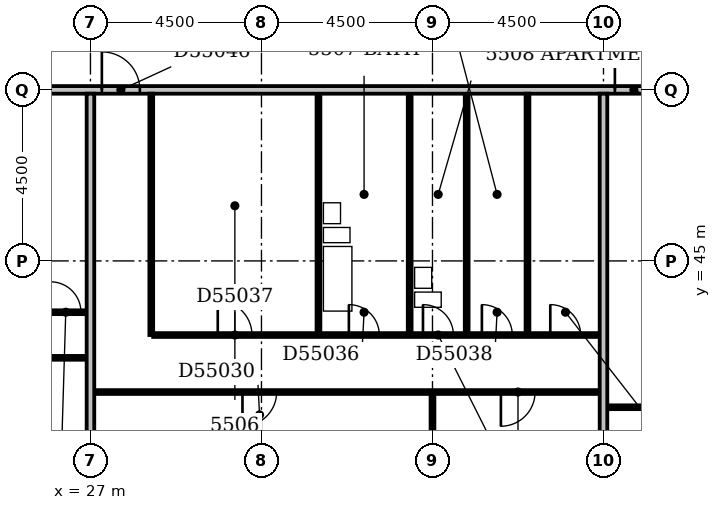
"""IFC4 building model, lengths in metres.
Left out: names, types, materials, properties, quantities, classifications, styles, units other than length and angle.
Written with IfcOpenShell. Run it as: python <this file> out.ifc"""

import sys

from ifc_helpers import new_model, si_unit, direction, frame, frame_2d, origin, place, context, subcontext, project, spatial, rectangle, extrude, element, fill, save


model = new_model("IFC4")
c1 = context("Model", 3, precision=1e-05, world=origin(), true_north=direction((0.0, 1.0)))
c2 = subcontext(c1, "Body", "Model", "MODEL_VIEW")
j1 = project(units=[si_unit("LENGTHUNIT", "METRE"), si_unit("PLANEANGLEUNIT", "RADIAN")], contexts=[c1])
p1 = place(None, origin())
s1 = spatial("IfcSite", under=j1, at=p1, CompositionType="ELEMENT")
p2 = place(p1, origin())
s2 = spatial("IfcBuilding", under=s1, at=p2, CompositionType="ELEMENT")
p3 = place(p2, frame((0.0, 0.0, 215.0)))
s3 = spatial("IfcBuildingStorey", under=s2, at=p3, CompositionType="ELEMENT", Elevation=215.0)
p4 = place(p3, frame((27.0, 36.45, 0.0), z_axis=(0.0, 0.0, 1.0), x_axis=(0.0, 1.0, 0.0)))
e1 = element("IfcWall", 1, at=p4, inside=s3, PredefinedType="PARTITIONING", context=c2, shape_type="SweptSolid", body=[
    extrude(rectangle(XDim=12.95, YDim=0.2, at=frame_2d((6.475, 0.0))), origin(), (0.0, 0.0, 1.0), 2.4),
])
p5 = place(p3, frame((36.0, 36.45, 0.0), z_axis=(0.0, 0.0, 1.0), x_axis=(0.0, 1.0, 0.0)))
e2 = element("IfcWall", 2, at=p5, inside=s3, PredefinedType="PARTITIONING", context=c2, shape_type="SweptSolid", body=[
    extrude(rectangle(XDim=5.05, YDim=0.1, at=frame_2d((2.525, 0.0))), origin(), (0.0, 0.0, 1.0), 2.4),
])
p6 = place(p3, frame((40.5, 36.45, 0.0), z_axis=(0.0, 0.0, 1.0), x_axis=(0.0, 1.0, 0.0)))
e3 = element("IfcWall", 3, at=p6, inside=s3, PredefinedType="PARTITIONING", context=c2, shape_type="SweptSolid", body=[
    extrude(rectangle(XDim=12.95, YDim=0.2, at=frame_2d((6.475, 0.0))), origin(), (0.0, 0.0, 1.0), 3.3),
])
p7 = place(p3, frame((40.6, 41.15, 0.0), z_axis=(0.0, 0.0, 1.0), x_axis=(1.0, 0.0, 0.0)))
e4 = element("IfcWall", 4, at=p7, inside=s3, PredefinedType="PARTITIONING", context=c2, shape_type="SweptSolid", body=[
    extrude(rectangle(XDim=8.8, YDim=0.1, at=frame_2d((4.4, 0.0))), origin(), (0.0, 0.0, 1.0), 3.3),
])
p8 = place(p7, frame((1.7, 0.0, 0.0)))
e5 = element("IfcOpeningElement", 5, at=p8, cuts=e4, PredefinedType="OPENING", context=c2, shape_type="SweptSolid", body=[
    extrude(rectangle(XDim=0.9, YDim=2.1, at=frame_2d((0.45, 1.05))), frame((0.0, 0.062, 0.0), z_axis=(0.0, -1.0, 0.0), x_axis=(1.0, 0.0, 0.0)), (0.0, 0.0, 1.0), 0.124),
])
p9 = place(p7, frame((6.2, 0.0, 0.0)))
e6 = element("IfcOpeningElement", 6, at=p9, cuts=e4, PredefinedType="OPENING", context=c2, shape_type="SweptSolid", body=[
    extrude(rectangle(XDim=0.9, YDim=2.1, at=frame_2d((0.45, 1.05))), frame((0.0, 0.062, 0.0), z_axis=(0.0, -1.0, 0.0), x_axis=(1.0, 0.0, 0.0)), (0.0, 0.0, 1.0), 0.124),
])
p10 = place(p3, frame((27.1, 41.55, 0.0), z_axis=(0.0, 0.0, 1.0), x_axis=(1.0, 0.0, 0.0)))
e7 = element("IfcWall", 7, at=p10, inside=s3, PredefinedType="PARTITIONING", context=c2, shape_type="SweptSolid", body=[
    extrude(rectangle(XDim=13.3, YDim=0.1, at=frame_2d((6.65, 0.0))), origin(), (0.0, 0.0, 1.0), 3.3),
])
p11 = place(p10, frame((3.9, 0.0, 0.0)))
e8 = element("IfcOpeningElement", 8, at=p11, cuts=e7, PredefinedType="OPENING", context=c2, shape_type="SweptSolid", body=[
    extrude(rectangle(XDim=0.9, YDim=2.1, at=frame_2d((0.45, 1.05))), frame((0.0, 0.062, 0.0), z_axis=(0.0, -1.0, 0.0), x_axis=(1.0, 0.0, 0.0)), (0.0, 0.0, 1.0), 0.124),
])
p12 = place(p10, frame((10.7, 0.0, 0.0)))
e9 = element("IfcOpeningElement", 9, at=p12, cuts=e7, PredefinedType="OPENING", context=c2, shape_type="SweptSolid", body=[
    extrude(rectangle(XDim=0.9, YDim=2.1, at=frame_2d((0.45, 1.05))), frame((0.0, 0.062, 0.0), z_axis=(0.0, -1.0, 0.0), x_axis=(1.0, 0.0, 0.0)), (0.0, 0.0, 1.0), 0.124),
])
p13 = place(p3, frame((22.6, 42.45, 0.0), z_axis=(0.0, 0.0, 1.0), x_axis=(1.0, 0.0, 0.0)))
e10 = element("IfcWall", 10, at=p13, inside=s3, PredefinedType="PARTITIONING", context=c2, shape_type="SweptSolid", body=[
    extrude(rectangle(XDim=4.3, YDim=0.1, at=frame_2d((2.15, 0.0))), origin(), (0.0, 0.0, 1.0), 3.3),
])
p14 = place(p13, frame((1.7, 0.0, 0.0)))
e11 = element("IfcOpeningElement", 11, at=p14, cuts=e10, PredefinedType="OPENING", context=c2, shape_type="SweptSolid", body=[
    extrude(rectangle(XDim=0.9, YDim=2.1, at=frame_2d((0.45, 1.05))), frame((0.0, 0.062, 0.0), z_axis=(0.0, -1.0, 0.0), x_axis=(1.0, 0.0, 0.0)), (0.0, 0.0, 1.0), 0.124),
])
p15 = place(p3, frame((28.6, 43.05, 0.0), z_axis=(0.0, 0.0, 1.0), x_axis=(0.0, 1.0, 0.0)))
e12 = element("IfcWall", 12, at=p15, inside=s3, PredefinedType="PARTITIONING", context=c2, shape_type="SweptSolid", body=[
    extrude(rectangle(XDim=6.35, YDim=0.1, at=frame_2d((3.175, 0.0))), origin(), (0.0, 0.0, 1.0), 3.3),
])
p16 = place(p3, frame((28.65, 43.05, 0.0), z_axis=(0.0, 0.0, 1.0), x_axis=(1.0, 0.0, 0.0)))
e13 = element("IfcWall", 13, at=p16, inside=s3, PredefinedType="PARTITIONING", context=c2, shape_type="SweptSolid", body=[
    extrude(rectangle(XDim=11.75, YDim=0.1, at=frame_2d((5.875, 0.0))), origin(), (0.0, 0.0, 1.0), 3.3),
])
p17 = place(p16, frame((5.15, 0.0, 0.0)))
e14 = element("IfcOpeningElement", 14, at=p17, cuts=e13, PredefinedType="OPENING", context=c2, shape_type="SweptSolid", body=[
    extrude(rectangle(XDim=0.8, YDim=2.1, at=frame_2d((0.4, 1.05))), frame((0.0, 0.062, 0.0), z_axis=(0.0, -1.0, 0.0), x_axis=(1.0, 0.0, 0.0)), (0.0, 0.0, 1.0), 0.124),
])
p18 = place(p16, frame((1.7, 0.0, 0.0)))
e15 = element("IfcOpeningElement", 15, at=p18, cuts=e13, PredefinedType="OPENING", context=c2, shape_type="SweptSolid", body=[
    extrude(rectangle(XDim=0.9, YDim=2.1, at=frame_2d((0.45, 1.05))), frame((0.0, 0.062, 0.0), z_axis=(0.0, -1.0, 0.0), x_axis=(1.0, 0.0, 0.0)), (0.0, 0.0, 1.0), 0.124),
])
p19 = place(p16, frame((8.65, 0.0, 0.0)))
e16 = element("IfcOpeningElement", 16, at=p19, cuts=e13, PredefinedType="OPENING", context=c2, shape_type="SweptSolid", body=[
    extrude(rectangle(XDim=0.8, YDim=2.1, at=frame_2d((0.4, 1.05))), frame((0.0, 0.062, 0.0), z_axis=(0.0, -1.0, 0.0), x_axis=(1.0, 0.0, 0.0)), (0.0, 0.0, 1.0), 0.124),
])
p20 = place(p16, frame((10.45, 0.0, 0.0)))
e17 = element("IfcOpeningElement", 17, at=p20, cuts=e13, PredefinedType="OPENING", context=c2, shape_type="SweptSolid", body=[
    extrude(rectangle(XDim=0.8, YDim=2.1, at=frame_2d((0.4, 1.05))), frame((0.0, 0.062, 0.0), z_axis=(0.0, -1.0, 0.0), x_axis=(1.0, 0.0, 0.0)), (0.0, 0.0, 1.0), 0.124),
])
p21 = place(p16, frame((7.1, 0.0, 0.0)))
e18 = element("IfcOpeningElement", 18, at=p21, cuts=e13, PredefinedType="OPENING", context=c2, shape_type="SweptSolid", body=[
    extrude(rectangle(XDim=0.8, YDim=2.1, at=frame_2d((0.4, 1.05))), frame((0.0, 0.062, 0.0), z_axis=(0.0, -1.0, 0.0), x_axis=(1.0, 0.0, 0.0)), (0.0, 0.0, 1.0), 0.124),
])
p22 = place(p3, frame((33.0, 43.1, 0.0), z_axis=(0.0, 0.0, 1.0), x_axis=(0.0, 1.0, 0.0)))
e19 = element("IfcWall", 19, at=p22, inside=s3, PredefinedType="PLUMBINGWALL", context=c2, shape_type="SweptSolid", body=[
    extrude(rectangle(XDim=6.3, YDim=0.1, at=frame_2d((3.15, 0.0))), origin(), (0.0, 0.0, 1.0), 3.3),
])
p23 = place(p3, frame((35.4, 43.1, 0.0), z_axis=(0.0, 0.0, 1.0), x_axis=(0.0, 1.0, 0.0)))
e20 = element("IfcWall", 20, at=p23, inside=s3, PredefinedType="PLUMBINGWALL", context=c2, shape_type="SweptSolid", body=[
    extrude(rectangle(XDim=6.3, YDim=0.1, at=frame_2d((3.15, 0.0))), origin(), (0.0, 0.0, 1.0), 2.4),
])
p24 = place(p3, frame((36.9, 43.1, 0.0), z_axis=(0.0, 0.0, 1.0), x_axis=(0.0, 1.0, 0.0)))
e21 = element("IfcWall", 21, at=p24, inside=s3, PredefinedType="PLUMBINGWALL", context=c2, shape_type="SweptSolid", body=[
    extrude(rectangle(XDim=6.3, YDim=0.1, at=frame_2d((3.15, 0.0))), origin(), (0.0, 0.0, 1.0), 3.3),
])
p25 = place(p3, frame((38.5, 43.1, 0.0), z_axis=(0.0, 0.0, 1.0), x_axis=(0.0, 1.0, 0.0)))
e22 = element("IfcWall", 22, at=p25, inside=s3, PredefinedType="PARTITIONING", context=c2, shape_type="SweptSolid", body=[
    extrude(rectangle(XDim=6.3, YDim=0.1, at=frame_2d((3.15, 0.0))), origin(), (0.0, 0.0, 1.0), 3.3),
])
p26 = place(p3, frame((25.75, 43.65, 0.0), z_axis=(0.0, 0.0, 1.0), x_axis=(1.0, 0.0, 0.0)))
e23 = element("IfcWall", 23, at=p26, inside=s3, PredefinedType="PARTITIONING", context=c2, shape_type="SweptSolid", body=[
    extrude(rectangle(XDim=1.15, YDim=0.1, at=frame_2d((0.575, 0.0))), origin(), (0.0, 0.0, 1.0), 3.3),
])
p27 = place(p26, frame((0.2, 0.0, 0.0)))
e24 = element("IfcOpeningElement", 24, at=p27, cuts=e23, PredefinedType="OPENING", context=c2, shape_type="SweptSolid", body=[
    extrude(rectangle(XDim=0.8, YDim=2.1, at=frame_2d((0.4, 1.05))), frame((0.0, 0.062, 0.0), z_axis=(0.0, -1.0, 0.0), x_axis=(1.0, 0.0, 0.0)), (0.0, 0.0, 1.0), 0.124),
])
p28 = place(p3, frame((22.6, 49.5, 0.0), z_axis=(0.0, 0.0, 1.0), x_axis=(1.0, 0.0, 0.0)))
e25 = element("IfcWall", 25, at=p28, inside=s3, PredefinedType="PARTITIONING", context=c2, shape_type="SweptSolid", body=[
    extrude(rectangle(XDim=30.95, YDim=0.2, at=frame_2d((15.475, 0.0))), origin(), (0.0, 0.0, 1.0), 3.3),
])
p29 = place(p28, frame((1.85, 0.0, 0.0)))
e26 = element("IfcOpeningElement", 26, at=p29, cuts=e25, PredefinedType="OPENING", context=c2, shape_type="SweptSolid", body=[
    extrude(rectangle(XDim=1.0, YDim=2.1, at=frame_2d((0.5, 1.05))), frame((0.0, 0.112, 0.0), z_axis=(0.0, -1.0, 0.0), x_axis=(1.0, 0.0, 0.0)), (0.0, 0.0, 1.0), 0.224),
])
p30 = place(p28, frame((4.7, 0.0, 0.0)))
e27 = element("IfcOpeningElement", 27, at=p30, cuts=e25, PredefinedType="OPENING", context=c2, shape_type="SweptSolid", body=[
    extrude(rectangle(XDim=1.0, YDim=2.1, at=frame_2d((0.5, 1.05))), frame((0.0, 0.112, 0.0), z_axis=(0.0, -1.0, 0.0), x_axis=(1.0, 0.0, 0.0)), (0.0, 0.0, 1.0), 0.224),
])
p31 = place(p28, frame((18.2, 0.0, 0.0)))
e28 = element("IfcOpeningElement", 28, at=p31, cuts=e25, PredefinedType="OPENING", context=c2, shape_type="SweptSolid", body=[
    extrude(rectangle(XDim=1.0, YDim=2.1, at=frame_2d((0.5, 1.05))), frame((0.0, 0.112, 0.0), z_axis=(0.0, -1.0, 0.0), x_axis=(1.0, 0.0, 0.0)), (0.0, 0.0, 1.0), 0.224),
])
p32 = place(p28, frame((27.15, 0.0, 0.0)))
e29 = element("IfcOpeningElement", 29, at=p32, cuts=e25, PredefinedType="OPENING", context=c2, shape_type="SweptSolid", body=[
    extrude(rectangle(XDim=1.0, YDim=2.1, at=frame_2d((0.5, 1.05))), frame((0.0, 0.112, 0.0), z_axis=(0.0, -1.0, 0.0), x_axis=(1.0, 0.0, 0.0)), (0.0, 0.0, 1.0), 0.224),
])
p33 = place(p11, frame((0.9, 0.0, 0.0), z_axis=(0.0, 0.0, 1.0), x_axis=(-1.0, 0.0, 0.0)))
e30 = element("IfcDoor", 30, at=p33, inside=s3, OperationType="SINGLE_SWING_RIGHT", PredefinedType="DOOR", context=c2, shape_type="SweptSolid", body=[
    extrude(rectangle(XDim=0.9, YDim=2.1, at=frame_2d((0.45, 1.05))), frame((0.0, 0.025, 0.0), z_axis=(0.0, -1.0, 0.0), x_axis=(1.0, 0.0, 0.0)), (0.0, 0.0, 1.0), 0.05),
])
fill(e8, e30)
p34 = place(p12, frame((0.9, 0.0, 0.0), z_axis=(0.0, 0.0, 1.0), x_axis=(-1.0, 0.0, 0.0)))
e31 = element("IfcDoor", 31, at=p34, inside=s3, OperationType="SINGLE_SWING_RIGHT", PredefinedType="DOOR", context=c2, shape_type="SweptSolid", body=[
    extrude(rectangle(XDim=0.9, YDim=2.1, at=frame_2d((0.45, 1.05))), frame((0.0, 0.025, 0.0), z_axis=(0.0, -1.0, 0.0), x_axis=(1.0, 0.0, 0.0)), (0.0, 0.0, 1.0), 0.05),
])
fill(e9, e31)
p35 = place(p17, origin())
e32 = element("IfcDoor", 32, at=p35, inside=s3, OperationType="SINGLE_SWING_LEFT", PredefinedType="DOOR", context=c2, shape_type="SweptSolid", body=[
    extrude(rectangle(XDim=0.8, YDim=2.1, at=frame_2d((0.4, 1.05))), frame((0.0, 0.025, 0.0), z_axis=(0.0, -1.0, 0.0), x_axis=(1.0, 0.0, 0.0)), (0.0, 0.0, 1.0), 0.05),
])
fill(e14, e32)
p36 = place(p18, origin())
e33 = element("IfcDoor", 33, at=p36, inside=s3, OperationType="SINGLE_SWING_LEFT", PredefinedType="DOOR", context=c2, shape_type="SweptSolid", body=[
    extrude(rectangle(XDim=0.9, YDim=2.1, at=frame_2d((0.45, 1.05))), frame((0.0, 0.025, 0.0), z_axis=(0.0, -1.0, 0.0), x_axis=(1.0, 0.0, 0.0)), (0.0, 0.0, 1.0), 0.05),
])
fill(e15, e33)
p37 = place(p19, origin())
e34 = element("IfcDoor", 34, at=p37, inside=s3, OperationType="SINGLE_SWING_LEFT", PredefinedType="DOOR", context=c2, shape_type="SweptSolid", body=[
    extrude(rectangle(XDim=0.8, YDim=2.1, at=frame_2d((0.4, 1.05))), frame((0.0, 0.025, 0.0), z_axis=(0.0, -1.0, 0.0), x_axis=(1.0, 0.0, 0.0)), (0.0, 0.0, 1.0), 0.05),
])
fill(e16, e34)
p38 = place(p20, origin())
e35 = element("IfcDoor", 35, at=p38, inside=s3, OperationType="SINGLE_SWING_LEFT", PredefinedType="DOOR", context=c2, shape_type="SweptSolid", body=[
    extrude(rectangle(XDim=0.8, YDim=2.1, at=frame_2d((0.4, 1.05))), frame((0.0, 0.025, 0.0), z_axis=(0.0, -1.0, 0.0), x_axis=(1.0, 0.0, 0.0)), (0.0, 0.0, 1.0), 0.05),
])
fill(e17, e35)
p39 = place(p21, origin())
e36 = element("IfcDoor", 36, at=p39, inside=s3, OperationType="SINGLE_SWING_LEFT", PredefinedType="DOOR", context=c2, shape_type="SweptSolid", body=[
    extrude(rectangle(XDim=0.8, YDim=2.1, at=frame_2d((0.4, 1.05))), frame((0.0, 0.025, 0.0), z_axis=(0.0, -1.0, 0.0), x_axis=(1.0, 0.0, 0.0)), (0.0, 0.0, 1.0), 0.05),
])
fill(e18, e36)
p40 = place(p27, origin())
e37 = element("IfcDoor", 37, at=p40, inside=s3, OperationType="SINGLE_SWING_LEFT", PredefinedType="DOOR", context=c2, shape_type="SweptSolid", body=[
    extrude(rectangle(XDim=0.8, YDim=2.1, at=frame_2d((0.4, 1.05))), frame((0.0, 0.025, 0.0), z_axis=(0.0, -1.0, 0.0), x_axis=(1.0, 0.0, 0.0)), (0.0, 0.0, 1.0), 0.05),
])
fill(e24, e37)
p41 = place(p30, origin())
e38 = element("IfcDoor", 38, at=p41, inside=s3, OperationType="SINGLE_SWING_LEFT", PredefinedType="DOOR", context=c2, shape_type="SweptSolid", body=[
    extrude(rectangle(XDim=1.0, YDim=2.1, at=frame_2d((0.5, 1.05))), frame((0.0, 0.025, 0.0), z_axis=(0.0, -1.0, 0.0), x_axis=(1.0, 0.0, 0.0)), (0.0, 0.0, 1.0), 0.05),
])
fill(e27, e38)
p42 = place(p31, origin())
e39 = element("IfcDoor", 39, at=p42, inside=s3, OperationType="SINGLE_SWING_LEFT", PredefinedType="DOOR", context=c2, shape_type="SweptSolid", body=[
    extrude(rectangle(XDim=1.0, YDim=2.1, at=frame_2d((0.5, 1.05))), frame((0.0, 0.025, 0.0), z_axis=(0.0, -1.0, 0.0), x_axis=(1.0, 0.0, 0.0)), (0.0, 0.0, 1.0), 0.05),
])
fill(e28, e39)
save(model, sys.argv[1])
